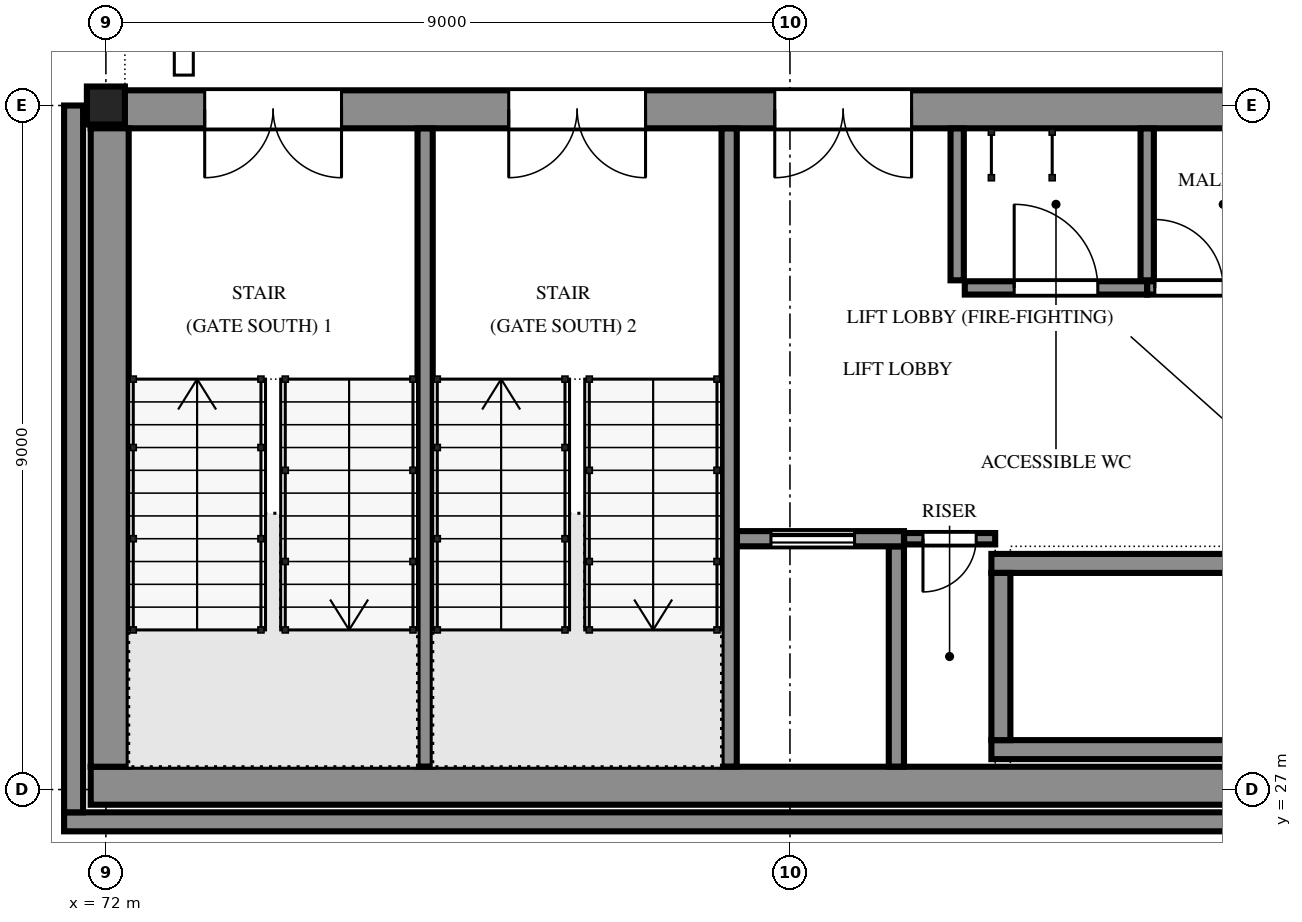
"""IFC4 building model, lengths in metres.
Left out: names, types, materials, properties, quantities, classifications, styles, units other than length and angle.
Written with IfcOpenShell. Run it as: python <this file> out.ifc"""

import sys

from ifc_helpers import new_model, si_unit, direction, frame, frame_2d, origin, origin_2d, place, context, subcontext, project, spatial, polyline, rectangle, hollow_rectangle, outline, extrude, element, fill, save


model = new_model("IFC4")
c1 = context("Model", 3, precision=1e-05, world=origin(), true_north=direction((0.0, 1.0)))
c2 = subcontext(c1, "Body", "Model", "MODEL_VIEW")
j1 = project(units=[si_unit("LENGTHUNIT", "METRE"), si_unit("PLANEANGLEUNIT", "RADIAN")], contexts=[c1])
p1 = place(None, origin())
s1 = spatial("IfcSite", under=j1, at=p1, CompositionType="ELEMENT")
p2 = place(p1, origin())
s2 = spatial("IfcBuilding", under=s1, at=p2, CompositionType="ELEMENT")
p3 = place(p2, frame((0.0, 0.0, 15.9)))
s3 = spatial("IfcBuildingStorey", under=s2, at=p3, CompositionType="ELEMENT", Elevation=15.9)
p4 = place(p3, frame((72.0, 36.0, 0.0), z_axis=(0.0, 0.0, 1.0), x_axis=(1.0, 0.0, 0.0)))
e1 = element("IfcColumn", 1, at=p4, inside=s3, PredefinedType="COLUMN", context=c2, shape_type="SweptSolid", body=[
    extrude(hollow_rectangle(XDim=0.5, YDim=0.5, WallThickness=0.032, at=origin_2d()), origin(), (0.0, 0.0, 1.0), 4.2),
])
p5 = place(p3, frame((71.8, 27.05, 0.0), z_axis=(0.0, 0.0, 1.0), x_axis=(1.0, 0.0, 0.0)))
e2 = element("IfcWall", 2, at=p5, inside=s3, PredefinedType="SOLIDWALL", context=c2, shape_type="SweptSolid", body=[
    extrude(rectangle(XDim=18.4, YDim=0.5, at=frame_2d((9.2, 0.0))), origin(), (0.0, 0.0, 1.0), 4.2),
])
p6 = place(p3, frame((71.8, 35.95, 0.0), z_axis=(0.0, 0.0, 1.0), x_axis=(1.0, 0.0, 0.0)))
e3 = element("IfcWall", 3, at=p6, inside=s3, PredefinedType="SOLIDWALL", context=c2, shape_type="SweptSolid", body=[
    extrude(rectangle(XDim=18.4, YDim=0.5, at=frame_2d((9.2, 0.0))), origin(), (0.0, 0.0, 1.0), 4.2),
])
p7 = place(p6, frame((1.5, 0.0, 0.0)))
e4 = element("IfcOpeningElement", 4, at=p7, cuts=e3, PredefinedType="OPENING", context=c2, shape_type="SweptSolid", body=[
    extrude(rectangle(XDim=1.8, YDim=2.1, at=frame_2d((0.9, 1.05))), frame((0.0, 0.26, 0.0), z_axis=(0.0, -1.0, 0.0), x_axis=(1.0, 0.0, 0.0)), (0.0, 0.0, 1.0), 0.52),
])
p8 = place(p6, frame((5.5, 0.0, 0.0)))
e5 = element("IfcOpeningElement", 5, at=p8, cuts=e3, PredefinedType="OPENING", context=c2, shape_type="SweptSolid", body=[
    extrude(rectangle(XDim=1.8, YDim=2.1, at=frame_2d((0.9, 1.05))), frame((0.0, 0.26, 0.0), z_axis=(0.0, -1.0, 0.0), x_axis=(1.0, 0.0, 0.0)), (0.0, 0.0, 1.0), 0.52),
])
p9 = place(p6, frame((9.0, 0.0, 0.0)))
e6 = element("IfcOpeningElement", 6, at=p9, cuts=e3, PredefinedType="OPENING", context=c2, shape_type="SweptSolid", body=[
    extrude(rectangle(XDim=1.8, YDim=2.1, at=frame_2d((0.9, 1.05))), frame((0.0, 0.26, 0.0), z_axis=(0.0, -1.0, 0.0), x_axis=(1.0, 0.0, 0.0)), (0.0, 0.0, 1.0), 0.52),
])
p10 = place(p6, frame((16.15, 0.0, 0.0)))
e7 = element("IfcOpeningElement", 7, at=p10, cuts=e3, PredefinedType="OPENING", context=c2, shape_type="SweptSolid", body=[
    extrude(rectangle(XDim=0.9, YDim=2.1, at=frame_2d((0.45, 1.05))), frame((0.0, 0.26, 0.0), z_axis=(0.0, -1.0, 0.0), x_axis=(1.0, 0.0, 0.0)), (0.0, 0.0, 1.0), 0.52),
])
p11 = place(p3, frame((72.05, 27.3, 0.0), z_axis=(0.0, 0.0, 1.0), x_axis=(0.0, 1.0, 0.0)))
e8 = element("IfcWall", 8, at=p11, inside=s3, PredefinedType="SOLIDWALL", context=c2, shape_type="SweptSolid", body=[
    extrude(rectangle(XDim=8.4, YDim=0.5, at=frame_2d((4.2, 0.0))), origin(), (0.0, 0.0, 1.0), 4.2),
])
for number, where, z_axis, x_axis in (
    (9, (76.2, 27.302, -0.15), (0.0, 0.0, 1.0), (0.0, 1.0, 0.0)),
    (10, (80.2, 27.302, -0.15), (0.0, 0.0, 1.0), (0.0, 1.0, 0.0)),
):
    element("IfcWall", number, at=place(p3, frame(where, z_axis=z_axis, x_axis=x_axis)), inside=s3, PredefinedType="SOLIDWALL", context=c2, shape_type="SweptSolid", body=[
        extrude(rectangle(XDim=8.396, YDim=0.2, at=frame_2d((4.198, 0.0))), origin(), (0.0, 0.0, 1.0), 3.666),
    ])
p12 = place(p3, frame((80.302, 30.3, 0.0), z_axis=(0.0, 0.0, 1.0), x_axis=(1.0, 0.0, 0.0)))
e11 = element("IfcWall", 11, at=p12, inside=s3, PredefinedType="SOLIDWALL", context=c2, shape_type="SweptSolid", body=[
    extrude(rectangle(XDim=2.198, YDim=0.2, at=frame_2d((1.099, 0.0))), origin(), (0.0, 0.0, 1.0), 3.516),
])
p13 = place(p12, frame((0.448, 0.0, 0.0)))
e12 = element("IfcOpeningElement", 12, at=p13, cuts=e11, PredefinedType="OPENING", context=c2, shape_type="SweptSolid", body=[
    extrude(rectangle(XDim=1.1, YDim=2.1, at=frame_2d((0.55, 1.05))), frame((0.0, 0.11, 0.0), z_axis=(0.0, -1.0, 0.0), x_axis=(1.0, 0.0, 0.0)), (0.0, 0.0, 1.0), 0.22),
])
p14 = place(p3, frame((82.4, 27.302, 0.0), z_axis=(0.0, 0.0, 1.0), x_axis=(0.0, 1.0, 0.0)))
e13 = element("IfcWall", 13, at=p14, inside=s3, PredefinedType="SOLIDWALL", context=c2, shape_type="SweptSolid", body=[
    extrude(rectangle(XDim=2.898, YDim=0.2, at=frame_2d((1.449, 0.0))), origin(), (0.0, 0.0, 1.0), 3.516),
])
for number, where, z_axis, x_axis in (
    (14, (83.65, 27.525, 0.0), (0.0, 0.0, 1.0), (1.0, 0.0, 0.0)),
    (15, (83.65, 29.975, 0.0), (0.0, 0.0, 1.0), (1.0, 0.0, 0.0)),
):
    element("IfcWall", number, at=place(p3, frame(where, z_axis=z_axis, x_axis=x_axis)), inside=s3, PredefinedType="SOLIDWALL", context=c2, shape_type="SweptSolid", body=[
        extrude(rectangle(XDim=3.4, YDim=0.25, at=frame_2d((1.7, 0.0))), origin(), (0.0, 0.0, 1.0), 3.516),
    ])
p15 = place(p3, frame((83.775, 27.65, 0.0), z_axis=(0.0, 0.0, 1.0), x_axis=(0.0, 1.0, 0.0)))
e16 = element("IfcWall", 16, at=p15, inside=s3, PredefinedType="SOLIDWALL", context=c2, shape_type="SweptSolid", body=[
    extrude(rectangle(XDim=2.2, YDim=0.25, at=frame_2d((1.1, 0.0))), origin(), (0.0, 0.0, 1.0), 3.516),
])
p16 = place(p3, frame((83.7, 30.3, 0.0), z_axis=(0.0, 0.0, 1.0), x_axis=(-1.0, 0.0, 0.0)))
e17 = element("IfcWall", 17, at=p16, inside=s3, PredefinedType="SOLIDWALL", context=c2, shape_type="SweptSolid", body=[
    extrude(rectangle(XDim=1.198, YDim=0.15, at=frame_2d((0.599, 0.0))), origin(), (0.0, 0.0, 1.0), 3.516),
])
p17 = place(p16, frame((0.25, 0.0, 0.0)))
e18 = element("IfcOpeningElement", 18, at=p17, cuts=e17, PredefinedType="OPENING", context=c2, shape_type="SweptSolid", body=[
    extrude(rectangle(XDim=0.7, YDim=2.0, at=frame_2d((0.35, 1.0))), frame((0.0, 0.085, 0.0), z_axis=(0.0, -1.0, 0.0), x_axis=(1.0, 0.0, 0.0)), (0.0, 0.0, 1.0), 0.17),
])
p18 = place(p3, frame((83.2, 35.698, 0.0), z_axis=(0.0, 0.0, 1.0), x_axis=(0.0, -1.0, 0.0)))
e19 = element("IfcWall", 19, at=p18, inside=s3, PredefinedType="PARTITIONING", context=c2, shape_type="SweptSolid", body=[
    extrude(rectangle(XDim=1.998, YDim=0.175, at=frame_2d((0.999, 0.0))), origin(), (0.0, 0.0, 1.0), 3.307),
])
p19 = place(p3, frame((83.3, 33.6, 0.0), z_axis=(0.0, 0.0, 1.0), x_axis=(1.0, 0.0, 0.0)))
e20 = element("IfcWall", 20, at=p19, inside=s3, PredefinedType="PARTITIONING", context=c2, shape_type="SweptSolid", body=[
    extrude(rectangle(XDim=2.4, YDim=0.175, at=frame_2d((1.2, 0.0))), origin(), (0.0, 0.0, 1.0), 3.307),
])
p20 = place(p19, frame((0.65, 0.0, 0.0)))
e21 = element("IfcOpeningElement", 21, at=p20, cuts=e20, PredefinedType="OPENING", context=c2, shape_type="SweptSolid", body=[
    extrude(rectangle(XDim=1.1, YDim=2.1, at=frame_2d((0.55, 1.05))), frame((0.0, 0.097, 0.0), z_axis=(0.0, -1.0, 0.0), x_axis=(1.0, 0.0, 0.0)), (0.0, 0.0, 1.0), 0.195),
])
p21 = place(p3, frame((85.7, 33.6, 0.0), z_axis=(0.0, 0.0, 1.0), x_axis=(1.0, 0.0, 0.0)))
e22 = element("IfcWall", 22, at=p21, inside=s3, PredefinedType="PARTITIONING", context=c2, shape_type="SweptSolid", body=[
    extrude(rectangle(XDim=1.1, YDim=0.175, at=frame_2d((0.55, 0.0))), origin(), (0.0, 0.0, 1.0), 3.307),
])
p22 = place(p21, frame((0.1, 0.0, 0.0)))
e23 = element("IfcOpeningElement", 23, at=p22, cuts=e22, PredefinedType="OPENING", context=c2, shape_type="SweptSolid", body=[
    extrude(rectangle(XDim=0.9, YDim=2.1, at=frame_2d((0.45, 1.05))), frame((0.0, 0.097, 0.0), z_axis=(0.0, -1.0, 0.0), x_axis=(1.0, 0.0, 0.0)), (0.0, 0.0, 1.0), 0.195),
])
p23 = place(p3, frame((85.7, 35.698, 0.0), z_axis=(0.0, 0.0, 1.0), x_axis=(0.0, -1.0, 0.0)))
e24 = element("IfcWall", 24, at=p23, inside=s3, PredefinedType="PARTITIONING", context=c2, shape_type="SweptSolid", body=[
    extrude(rectangle(XDim=1.998, YDim=0.175, at=frame_2d((0.999, 0.0))), origin(), (0.0, 0.0, 1.0), 3.307),
])
p24 = place(p13, origin())
e25 = element("IfcDoor", 25, at=p24, inside=s3, OperationType="SLIDING_TO_LEFT", PredefinedType="DOOR", context=c2, shape_type="SweptSolid", body=[
    extrude(outline(polyline([(0.0, 0.0), (0.07, 0.0), (0.07, 2.03), (1.03, 2.03), (1.03, 0.0), (1.1, 0.0), (1.1, 2.1), (0.0, 2.1), (0.0, 0.0)])), frame((0.0, 0.025, 0.0), z_axis=(0.0, -1.0, 0.0), x_axis=(1.0, 0.0, 0.0)), (0.0, 0.0, 1.0), 0.05),
    extrude(rectangle(XDim=0.524, YDim=2.016, at=frame_2d((0.336, 1.018))), frame((0.0, 0.018, 0.0), z_axis=(0.0, -1.0, 0.0), x_axis=(1.0, 0.0, 0.0)), (0.0, 0.0, 1.0), 0.016),
    extrude(rectangle(XDim=0.52, YDim=2.016, at=frame_2d((0.766, 1.018))), frame((0.0, -0.002, 0.0), z_axis=(0.0, -1.0, 0.0), x_axis=(1.0, 0.0, 0.0)), (0.0, 0.0, 1.0), 0.016),
])
fill(e12, e25)
p25 = place(p7, frame((1.8, 0.0, 0.0), z_axis=(0.0, 0.0, 1.0), x_axis=(-1.0, 0.0, 0.0)))
e26 = element("IfcDoor", 26, at=p25, inside=s3, OperationType="DOUBLE_DOOR_SINGLE_SWING", PredefinedType="DOOR", context=c2, shape_type="SweptSolid", body=[
    extrude(outline(polyline([(0.0, 0.0), (0.07, 0.0), (0.07, 2.03), (1.73, 2.03), (1.73, 0.0), (1.8, 0.0), (1.8, 2.1), (0.0, 2.1), (0.0, 0.0)])), frame((0.0, 0.025, 0.0), z_axis=(0.0, -1.0, 0.0), x_axis=(1.0, 0.0, 0.0)), (0.0, 0.0, 1.0), 0.05),
    extrude(outline(polyline([(0.074, 0.01), (0.897, 0.01), (0.897, 2.026), (0.074, 2.026), (0.074, 0.01)]), holes=[polyline([(0.194, 0.16), (0.777, 0.16), (0.777, 1.01), (0.194, 1.01), (0.194, 0.16)]), polyline([(0.335, 1.16), (0.635, 1.16), (0.635, 1.76), (0.335, 1.76), (0.335, 1.16)])]), frame((0.0, 0.017, 0.0), z_axis=(0.0, -1.0, 0.0), x_axis=(1.0, 0.0, 0.0)), (0.0, 0.0, 1.0), 0.035),
    extrude(rectangle(XDim=0.583, YDim=0.85, at=frame_2d((0.485, 0.585))), frame((0.0, 0.009, 0.0), z_axis=(0.0, -1.0, 0.0), x_axis=(1.0, 0.0, 0.0)), (0.0, 0.0, 1.0), 0.017),
    extrude(rectangle(XDim=0.3, YDim=0.6, at=frame_2d((0.485, 1.46))), frame((0.0, 0.006, 0.0), z_axis=(0.0, -1.0, 0.0), x_axis=(1.0, 0.0, 0.0)), (0.0, 0.0, 1.0), 0.012),
    extrude(outline(polyline([(0.903, 0.01), (1.726, 0.01), (1.726, 2.026), (0.903, 2.026), (0.903, 0.01)]), holes=[polyline([(1.023, 0.16), (1.606, 0.16), (1.606, 1.01), (1.023, 1.01), (1.023, 0.16)]), polyline([(1.165, 1.16), (1.465, 1.16), (1.465, 1.76), (1.165, 1.76), (1.165, 1.16)])]), frame((0.0, 0.017, 0.0), z_axis=(0.0, -1.0, 0.0), x_axis=(1.0, 0.0, 0.0)), (0.0, 0.0, 1.0), 0.035),
    extrude(rectangle(XDim=0.583, YDim=0.85, at=frame_2d((1.314, 0.585))), frame((0.0, 0.009, 0.0), z_axis=(0.0, -1.0, 0.0), x_axis=(1.0, 0.0, 0.0)), (0.0, 0.0, 1.0), 0.017),
    extrude(rectangle(XDim=0.3, YDim=0.6, at=frame_2d((1.314, 1.46))), frame((0.0, 0.006, 0.0), z_axis=(0.0, -1.0, 0.0), x_axis=(1.0, 0.0, 0.0)), (0.0, 0.0, 1.0), 0.012),
])
fill(e4, e26)
p26 = place(p8, frame((1.8, 0.0, 0.0), z_axis=(0.0, 0.0, 1.0), x_axis=(-1.0, 0.0, 0.0)))
e27 = element("IfcDoor", 27, at=p26, inside=s3, OperationType="DOUBLE_DOOR_SINGLE_SWING", PredefinedType="DOOR", context=c2, shape_type="SweptSolid", body=[
    extrude(outline(polyline([(0.0, 0.0), (0.07, 0.0), (0.07, 2.03), (1.73, 2.03), (1.73, 0.0), (1.8, 0.0), (1.8, 2.1), (0.0, 2.1), (0.0, 0.0)])), frame((0.0, 0.025, 0.0), z_axis=(0.0, -1.0, 0.0), x_axis=(1.0, 0.0, 0.0)), (0.0, 0.0, 1.0), 0.05),
    extrude(outline(polyline([(0.074, 0.01), (0.897, 0.01), (0.897, 2.026), (0.074, 2.026), (0.074, 0.01)]), holes=[polyline([(0.194, 0.16), (0.777, 0.16), (0.777, 1.01), (0.194, 1.01), (0.194, 0.16)]), polyline([(0.335, 1.16), (0.635, 1.16), (0.635, 1.76), (0.335, 1.76), (0.335, 1.16)])]), frame((0.0, 0.017, 0.0), z_axis=(0.0, -1.0, 0.0), x_axis=(1.0, 0.0, 0.0)), (0.0, 0.0, 1.0), 0.035),
    extrude(rectangle(XDim=0.583, YDim=0.85, at=frame_2d((0.485, 0.585))), frame((0.0, 0.009, 0.0), z_axis=(0.0, -1.0, 0.0), x_axis=(1.0, 0.0, 0.0)), (0.0, 0.0, 1.0), 0.017),
    extrude(rectangle(XDim=0.3, YDim=0.6, at=frame_2d((0.485, 1.46))), frame((0.0, 0.006, 0.0), z_axis=(0.0, -1.0, 0.0), x_axis=(1.0, 0.0, 0.0)), (0.0, 0.0, 1.0), 0.012),
    extrude(outline(polyline([(0.903, 0.01), (1.726, 0.01), (1.726, 2.026), (0.903, 2.026), (0.903, 0.01)]), holes=[polyline([(1.023, 0.16), (1.606, 0.16), (1.606, 1.01), (1.023, 1.01), (1.023, 0.16)]), polyline([(1.165, 1.16), (1.465, 1.16), (1.465, 1.76), (1.165, 1.76), (1.165, 1.16)])]), frame((0.0, 0.017, 0.0), z_axis=(0.0, -1.0, 0.0), x_axis=(1.0, 0.0, 0.0)), (0.0, 0.0, 1.0), 0.035),
    extrude(rectangle(XDim=0.583, YDim=0.85, at=frame_2d((1.314, 0.585))), frame((0.0, 0.009, 0.0), z_axis=(0.0, -1.0, 0.0), x_axis=(1.0, 0.0, 0.0)), (0.0, 0.0, 1.0), 0.017),
    extrude(rectangle(XDim=0.3, YDim=0.6, at=frame_2d((1.314, 1.46))), frame((0.0, 0.006, 0.0), z_axis=(0.0, -1.0, 0.0), x_axis=(1.0, 0.0, 0.0)), (0.0, 0.0, 1.0), 0.012),
])
fill(e5, e27)
p27 = place(p9, frame((1.8, 0.0, 0.0), z_axis=(0.0, 0.0, 1.0), x_axis=(-1.0, 0.0, 0.0)))
e28 = element("IfcDoor", 28, at=p27, inside=s3, OperationType="DOUBLE_DOOR_SINGLE_SWING", PredefinedType="DOOR", context=c2, shape_type="SweptSolid", body=[
    extrude(outline(polyline([(0.0, 0.0), (0.07, 0.0), (0.07, 2.03), (1.73, 2.03), (1.73, 0.0), (1.8, 0.0), (1.8, 2.1), (0.0, 2.1), (0.0, 0.0)])), frame((0.0, 0.025, 0.0), z_axis=(0.0, -1.0, 0.0), x_axis=(1.0, 0.0, 0.0)), (0.0, 0.0, 1.0), 0.05),
    extrude(outline(polyline([(0.074, 0.01), (0.897, 0.01), (0.897, 2.026), (0.074, 2.026), (0.074, 0.01)]), holes=[polyline([(0.194, 0.16), (0.777, 0.16), (0.777, 1.01), (0.194, 1.01), (0.194, 0.16)]), polyline([(0.335, 1.16), (0.635, 1.16), (0.635, 1.76), (0.335, 1.76), (0.335, 1.16)])]), frame((0.0, 0.017, 0.0), z_axis=(0.0, -1.0, 0.0), x_axis=(1.0, 0.0, 0.0)), (0.0, 0.0, 1.0), 0.035),
    extrude(rectangle(XDim=0.583, YDim=0.85, at=frame_2d((0.485, 0.585))), frame((0.0, 0.009, 0.0), z_axis=(0.0, -1.0, 0.0), x_axis=(1.0, 0.0, 0.0)), (0.0, 0.0, 1.0), 0.017),
    extrude(rectangle(XDim=0.3, YDim=0.6, at=frame_2d((0.485, 1.46))), frame((0.0, 0.006, 0.0), z_axis=(0.0, -1.0, 0.0), x_axis=(1.0, 0.0, 0.0)), (0.0, 0.0, 1.0), 0.012),
    extrude(outline(polyline([(0.903, 0.01), (1.726, 0.01), (1.726, 2.026), (0.903, 2.026), (0.903, 0.01)]), holes=[polyline([(1.023, 0.16), (1.606, 0.16), (1.606, 1.01), (1.023, 1.01), (1.023, 0.16)]), polyline([(1.165, 1.16), (1.465, 1.16), (1.465, 1.76), (1.165, 1.76), (1.165, 1.16)])]), frame((0.0, 0.017, 0.0), z_axis=(0.0, -1.0, 0.0), x_axis=(1.0, 0.0, 0.0)), (0.0, 0.0, 1.0), 0.035),
    extrude(rectangle(XDim=0.583, YDim=0.85, at=frame_2d((1.314, 0.585))), frame((0.0, 0.009, 0.0), z_axis=(0.0, -1.0, 0.0), x_axis=(1.0, 0.0, 0.0)), (0.0, 0.0, 1.0), 0.017),
    extrude(rectangle(XDim=0.3, YDim=0.6, at=frame_2d((1.314, 1.46))), frame((0.0, 0.006, 0.0), z_axis=(0.0, -1.0, 0.0), x_axis=(1.0, 0.0, 0.0)), (0.0, 0.0, 1.0), 0.012),
])
fill(e6, e28)
p28 = place(p17, origin())
e29 = element("IfcDoor", 29, at=p28, inside=s3, OperationType="SINGLE_SWING_RIGHT", PredefinedType="DOOR", context=c2, shape_type="SweptSolid", body=[
    extrude(outline(polyline([(0.0, 0.0), (0.07, 0.0), (0.07, 1.93), (0.63, 1.93), (0.63, 0.0), (0.7, 0.0), (0.7, 2.0), (0.0, 2.0), (0.0, 0.0)])), frame((0.0, 0.025, 0.0), z_axis=(0.0, -1.0, 0.0), x_axis=(1.0, 0.0, 0.0)), (0.0, 0.0, 1.0), 0.05),
    extrude(outline(polyline([(0.074, 0.01), (0.626, 0.01), (0.626, 1.926), (0.074, 1.926), (0.074, 0.01)]), holes=[polyline([(0.184, 0.16), (0.516, 0.16), (0.516, 1.01), (0.184, 1.01), (0.184, 0.16)]), polyline([(0.2, 1.16), (0.5, 1.16), (0.5, 1.76), (0.2, 1.76), (0.2, 1.16)])]), frame((0.0, 0.017, 0.0), z_axis=(0.0, -1.0, 0.0), x_axis=(1.0, 0.0, 0.0)), (0.0, 0.0, 1.0), 0.035),
    extrude(rectangle(XDim=0.331, YDim=0.85, at=frame_2d((0.35, 0.585))), frame((0.0, 0.009, 0.0), z_axis=(0.0, -1.0, 0.0), x_axis=(1.0, 0.0, 0.0)), (0.0, 0.0, 1.0), 0.017),
    extrude(rectangle(XDim=0.3, YDim=0.6, at=frame_2d((0.35, 1.46))), frame((0.0, 0.006, 0.0), z_axis=(0.0, -1.0, 0.0), x_axis=(1.0, 0.0, 0.0)), (0.0, 0.0, 1.0), 0.012),
])
fill(e18, e29)
p29 = place(p20, origin())
e30 = element("IfcDoor", 30, at=p29, inside=s3, OperationType="SINGLE_SWING_LEFT", PredefinedType="DOOR", context=c2, shape_type="SweptSolid", body=[
    extrude(outline(polyline([(0.0, 0.0), (0.07, 0.0), (0.07, 2.03), (1.03, 2.03), (1.03, 0.0), (1.1, 0.0), (1.1, 2.1), (0.0, 2.1), (0.0, 0.0)])), frame((0.0, 0.025, 0.0), z_axis=(0.0, -1.0, 0.0), x_axis=(1.0, 0.0, 0.0)), (0.0, 0.0, 1.0), 0.05),
    extrude(outline(polyline([(0.074, 0.01), (1.026, 0.01), (1.026, 2.026), (0.074, 2.026), (0.074, 0.01)]), holes=[polyline([(0.194, 0.16), (0.906, 0.16), (0.906, 1.01), (0.194, 1.01), (0.194, 0.16)]), polyline([(0.4, 1.16), (0.7, 1.16), (0.7, 1.76), (0.4, 1.76), (0.4, 1.16)])]), frame((0.0, 0.017, 0.0), z_axis=(0.0, -1.0, 0.0), x_axis=(1.0, 0.0, 0.0)), (0.0, 0.0, 1.0), 0.035),
    extrude(rectangle(XDim=0.712, YDim=0.85, at=frame_2d((0.55, 0.585))), frame((0.0, 0.009, 0.0), z_axis=(0.0, -1.0, 0.0), x_axis=(1.0, 0.0, 0.0)), (0.0, 0.0, 1.0), 0.017),
    extrude(rectangle(XDim=0.3, YDim=0.6, at=frame_2d((0.55, 1.46))), frame((0.0, 0.006, 0.0), z_axis=(0.0, -1.0, 0.0), x_axis=(1.0, 0.0, 0.0)), (0.0, 0.0, 1.0), 0.012),
])
fill(e21, e30)
p30 = place(p22, origin())
e31 = element("IfcDoor", 31, at=p30, inside=s3, OperationType="SINGLE_SWING_LEFT", PredefinedType="DOOR", context=c2, shape_type="SweptSolid", body=[
    extrude(outline(polyline([(0.0, 0.0), (0.07, 0.0), (0.07, 2.03), (0.83, 2.03), (0.83, 0.0), (0.9, 0.0), (0.9, 2.1), (0.0, 2.1), (0.0, 0.0)])), frame((0.0, 0.025, 0.0), z_axis=(0.0, -1.0, 0.0), x_axis=(1.0, 0.0, 0.0)), (0.0, 0.0, 1.0), 0.05),
    extrude(outline(polyline([(0.074, 0.01), (0.826, 0.01), (0.826, 2.026), (0.074, 2.026), (0.074, 0.01)]), holes=[polyline([(0.194, 0.16), (0.706, 0.16), (0.706, 1.01), (0.194, 1.01), (0.194, 0.16)]), polyline([(0.3, 1.16), (0.6, 1.16), (0.6, 1.76), (0.3, 1.76), (0.3, 1.16)])]), frame((0.0, 0.017, 0.0), z_axis=(0.0, -1.0, 0.0), x_axis=(1.0, 0.0, 0.0)), (0.0, 0.0, 1.0), 0.035),
    extrude(rectangle(XDim=0.512, YDim=0.85, at=frame_2d((0.45, 0.585))), frame((0.0, 0.009, 0.0), z_axis=(0.0, -1.0, 0.0), x_axis=(1.0, 0.0, 0.0)), (0.0, 0.0, 1.0), 0.017),
    extrude(rectangle(XDim=0.3, YDim=0.6, at=frame_2d((0.45, 1.46))), frame((0.0, 0.006, 0.0), z_axis=(0.0, -1.0, 0.0), x_axis=(1.0, 0.0, 0.0)), (0.0, 0.0, 1.0), 0.012),
])
fill(e23, e31)
save(model, sys.argv[1])
